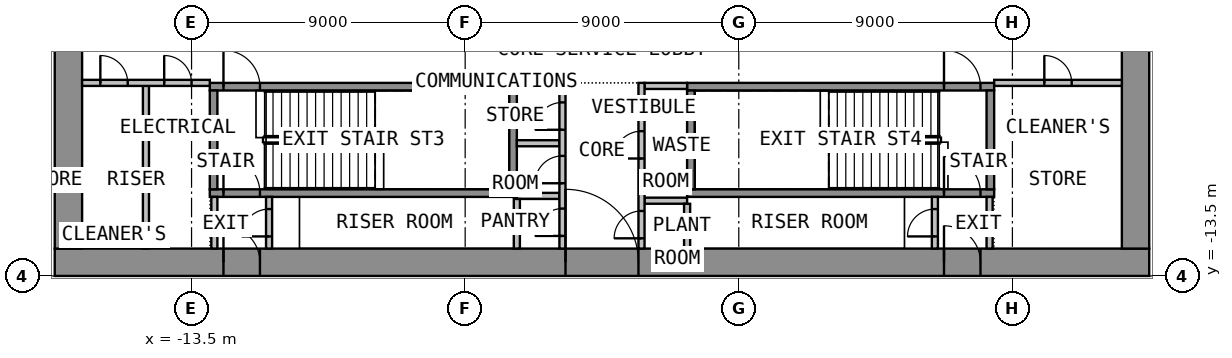
"""IFC4 building model, lengths in metres.
Left out: names, types, materials, properties, quantities, classifications, styles, units other than length and angle.
Written with IfcOpenShell. Run it as: python <this file> out.ifc"""

import sys

from ifc_helpers import new_model, si_unit, direction, frame, frame_2d, origin, place, context, subcontext, project, spatial, rectangle, extrude, element, fill, save


model = new_model("IFC4")
c1 = context("Model", 3, precision=1e-05, world=origin(), true_north=direction((0.0, 1.0)))
c2 = subcontext(c1, "Body", "Model", "MODEL_VIEW")
j1 = project(units=[si_unit("LENGTHUNIT", "METRE"), si_unit("PLANEANGLEUNIT", "RADIAN")], contexts=[c1])
p1 = place(None, origin())
s1 = spatial("IfcSite", under=j1, at=p1, CompositionType="ELEMENT")
p2 = place(p1, origin())
s2 = spatial("IfcBuilding", under=s1, at=p2, CompositionType="ELEMENT")
p3 = place(p2, frame((0.0, 0.0, 10.8)))
s3 = spatial("IfcBuildingStorey", under=s2, at=p3, CompositionType="ELEMENT", Elevation=10.8)
p4 = place(p3, frame((-18.0, -13.05, 0.0), z_axis=(0.0, 0.0, 1.0), x_axis=(1.0, 0.0, 0.0)))
e1 = element("IfcWall", 1, at=p4, inside=s3, PredefinedType="SHEAR", context=c2, shape_type="SweptSolid", body=[
    extrude(rectangle(XDim=36.0, YDim=0.9, at=frame_2d((18.0, 0.0))), origin(), (0.0, 0.0, 1.0), 4.4),
])
p5 = place(p4, frame((16.8, 0.0, 0.0)))
e2 = element("IfcOpeningElement", 2, at=p5, cuts=e1, PredefinedType="OPENING", context=c2, shape_type="SweptSolid", body=[
    extrude(rectangle(XDim=2.4, YDim=2.1, at=frame_2d((1.2, 1.05))), frame((0.0, 0.46, 0.0), z_axis=(0.0, -1.0, 0.0), x_axis=(1.0, 0.0, 0.0)), (0.0, 0.0, 1.0), 0.92),
])
p6 = place(p4, frame((5.55, 0.0, 0.0)))
e3 = element("IfcOpeningElement", 3, at=p6, cuts=e1, PredefinedType="OPENING", context=c2, shape_type="SweptSolid", body=[
    extrude(rectangle(XDim=1.2, YDim=2.1, at=frame_2d((0.6, 1.05))), frame((0.0, 0.46, 0.0), z_axis=(0.0, -1.0, 0.0), x_axis=(1.0, 0.0, 0.0)), (0.0, 0.0, 1.0), 0.92),
])
p7 = place(p4, frame((29.25, 0.0, 0.0)))
e4 = element("IfcOpeningElement", 4, at=p7, cuts=e1, PredefinedType="OPENING", context=c2, shape_type="SweptSolid", body=[
    extrude(rectangle(XDim=1.2, YDim=2.1, at=frame_2d((0.6, 1.05))), frame((0.0, 0.46, 0.0), z_axis=(0.0, -1.0, 0.0), x_axis=(1.0, 0.0, 0.0)), (0.0, 0.0, 1.0), 0.92),
])
p8 = place(p3, frame((-17.55, -12.6, 0.0), z_axis=(0.0, 0.0, 1.0), x_axis=(0.0, 1.0, 0.0)))
e5 = element("IfcWall", 5, at=p8, inside=s3, PredefinedType="SHEAR", context=c2, shape_type="SweptSolid", body=[
    extrude(rectangle(XDim=25.2, YDim=0.9, at=frame_2d((12.6, 0.0))), origin(), (0.0, 0.0, 1.0), 4.4),
])
p9 = place(p8, frame((11.4, 0.0, 0.0)))
e6 = element("IfcOpeningElement", 6, at=p9, cuts=e5, PredefinedType="OPENING", context=c2, shape_type="SweptSolid", body=[
    extrude(rectangle(XDim=2.4, YDim=2.1, at=frame_2d((1.2, 1.05))), frame((0.0, 0.46, 0.0), z_axis=(0.0, -1.0, 0.0), x_axis=(1.0, 0.0, 0.0)), (0.0, 0.0, 1.0), 0.92),
])
p10 = place(p3, frame((17.55, -12.6, 0.0), z_axis=(0.0, 0.0, 1.0), x_axis=(0.0, 1.0, 0.0)))
e7 = element("IfcWall", 7, at=p10, inside=s3, PredefinedType="SHEAR", context=c2, shape_type="SweptSolid", body=[
    extrude(rectangle(XDim=25.2, YDim=0.9, at=frame_2d((12.6, 0.0))), origin(), (0.0, 0.0, 1.0), 4.4),
])
p11 = place(p10, frame((11.4, 0.0, 0.0)))
e8 = element("IfcOpeningElement", 8, at=p11, cuts=e7, PredefinedType="OPENING", context=c2, shape_type="SweptSolid", body=[
    extrude(rectangle(XDim=2.4, YDim=2.1, at=frame_2d((1.2, 1.05))), frame((0.0, 0.46, 0.0), z_axis=(0.0, -1.0, 0.0), x_axis=(1.0, 0.0, 0.0)), (0.0, 0.0, 1.0), 0.92),
])
p12 = place(p3, frame((-12.9, -10.775, 0.0), z_axis=(0.0, 0.0, 1.0), x_axis=(1.0, 0.0, 0.0)))
e9 = element("IfcWall", 9, at=p12, inside=s3, PredefinedType="SHEAR", context=c2, shape_type="SweptSolid", body=[
    extrude(rectangle(XDim=10.1, YDim=0.25, at=frame_2d((5.05, 0.0))), origin(), (0.0, 0.0, 1.0), 4.4),
])
p13 = place(p12, frame((0.45, 0.0, 0.0)))
e10 = element("IfcOpeningElement", 10, at=p13, cuts=e9, PredefinedType="OPENING", context=c2, shape_type="SweptSolid", body=[
    extrude(rectangle(XDim=1.2, YDim=2.1, at=frame_2d((0.6, 1.05))), frame((0.0, 0.135, 0.0), z_axis=(0.0, -1.0, 0.0), x_axis=(1.0, 0.0, 0.0)), (0.0, 0.0, 1.0), 0.27),
])
p14 = place(p3, frame((-12.9, -7.275, 0.0), z_axis=(0.0, 0.0, 1.0), x_axis=(1.0, 0.0, 0.0)))
e11 = element("IfcWall", 11, at=p14, inside=s3, PredefinedType="SHEAR", context=c2, shape_type="SweptSolid", body=[
    extrude(rectangle(XDim=10.1, YDim=0.25, at=frame_2d((5.05, 0.0))), origin(), (0.0, 0.0, 1.0), 4.4),
])
p15 = place(p14, frame((0.45, 0.0, 0.0)))
e12 = element("IfcOpeningElement", 12, at=p15, cuts=e11, PredefinedType="OPENING", context=c2, shape_type="SweptSolid", body=[
    extrude(rectangle(XDim=1.2, YDim=2.1, at=frame_2d((0.6, 1.05))), frame((0.0, 0.135, 0.0), z_axis=(0.0, -1.0, 0.0), x_axis=(1.0, 0.0, 0.0)), (0.0, 0.0, 1.0), 0.27),
])
for number, where, z_axis, x_axis in (
    (13, (-12.775, -10.65, 0.0), (0.0, 0.0, 1.0), (0.0, 1.0, 0.0)),
    (14, (-2.925, -10.65, 0.0), (0.0, 0.0, 1.0), (0.0, 1.0, 0.0)),
):
    element("IfcWall", number, at=place(p3, frame(where, z_axis=z_axis, x_axis=x_axis)), inside=s3, PredefinedType="SHEAR", context=c2, shape_type="SweptSolid", body=[
        extrude(rectangle(XDim=3.25, YDim=0.25, at=frame_2d((1.625, 0.0))), origin(), (0.0, 0.0, 1.0), 4.4),
    ])
p16 = place(p3, frame((2.8, -10.775, 0.0), z_axis=(0.0, 0.0, 1.0), x_axis=(1.0, 0.0, 0.0)))
e15 = element("IfcWall", 15, at=p16, inside=s3, PredefinedType="SHEAR", context=c2, shape_type="SweptSolid", body=[
    extrude(rectangle(XDim=10.1, YDim=0.25, at=frame_2d((5.05, 0.0))), origin(), (0.0, 0.0, 1.0), 4.4),
])
p17 = place(p16, frame((8.45, 0.0, 0.0)))
e16 = element("IfcOpeningElement", 16, at=p17, cuts=e15, PredefinedType="OPENING", context=c2, shape_type="SweptSolid", body=[
    extrude(rectangle(XDim=1.2, YDim=2.1, at=frame_2d((0.6, 1.05))), frame((0.0, 0.135, 0.0), z_axis=(0.0, -1.0, 0.0), x_axis=(1.0, 0.0, 0.0)), (0.0, 0.0, 1.0), 0.27),
])
p18 = place(p3, frame((2.8, -7.275, 0.0), z_axis=(0.0, 0.0, 1.0), x_axis=(1.0, 0.0, 0.0)))
e17 = element("IfcWall", 17, at=p18, inside=s3, PredefinedType="SHEAR", context=c2, shape_type="SweptSolid", body=[
    extrude(rectangle(XDim=10.1, YDim=0.25, at=frame_2d((5.05, 0.0))), origin(), (0.0, 0.0, 1.0), 4.4),
])
p19 = place(p18, frame((8.45, 0.0, 0.0)))
e18 = element("IfcOpeningElement", 18, at=p19, cuts=e17, PredefinedType="OPENING", context=c2, shape_type="SweptSolid", body=[
    extrude(rectangle(XDim=1.2, YDim=2.1, at=frame_2d((0.6, 1.05))), frame((0.0, 0.135, 0.0), z_axis=(0.0, -1.0, 0.0), x_axis=(1.0, 0.0, 0.0)), (0.0, 0.0, 1.0), 0.27),
])
for number, where, z_axis, x_axis in (
    (19, (2.925, -10.65, 0.0), (0.0, 0.0, 1.0), (0.0, 1.0, 0.0)),
    (20, (12.775, -10.65, 0.0), (0.0, 0.0, 1.0), (0.0, 1.0, 0.0)),
):
    element("IfcWall", number, at=place(p3, frame(where, z_axis=z_axis, x_axis=x_axis)), inside=s3, PredefinedType="SHEAR", context=c2, shape_type="SweptSolid", body=[
        extrude(rectangle(XDim=3.25, YDim=0.25, at=frame_2d((1.625, 0.0))), origin(), (0.0, 0.0, 1.0), 4.4),
    ])
for number, where, z_axis, x_axis in (
    (21, (-2.8, -7.25, 0.0), (0.0, 0.0, 1.0), (1.0, 0.0, 0.0)),
    (22, (-2.8, -9.135, 0.0), (0.0, 0.0, 1.0), (1.0, 0.0, 0.0)),
    (23, (-2.8, -10.867, 0.0), (0.0, 0.0, 1.0), (1.0, 0.0, 0.0)),
    (24, (1.4, -7.25, 0.0), (0.0, 0.0, 1.0), (1.0, 0.0, 0.0)),
    (25, (1.4, -11.025, 0.0), (0.0, 0.0, 1.0), (1.0, 0.0, 0.0)),
):
    element("IfcWall", number, at=place(p3, frame(where, z_axis=z_axis, x_axis=x_axis)), inside=s3, PredefinedType="PARTITIONING", context=c2, shape_type="SweptSolid", body=[
        extrude(rectangle(XDim=1.4, YDim=0.2, at=frame_2d((0.7, 0.0))), origin(), (0.0, 0.0, 1.0), 4.4),
    ])
p20 = place(p3, frame((-1.3, -12.6, 0.0), z_axis=(0.0, 0.0, 1.0), x_axis=(0.0, 1.0, 0.0)))
e26 = element("IfcWall", 26, at=p20, inside=s3, PredefinedType="PARTITIONING", context=c2, shape_type="SweptSolid", body=[
    extrude(rectangle(XDim=5.45, YDim=0.2, at=frame_2d((2.725, 0.0))), origin(), (0.0, 0.0, 1.0), 4.4),
])
p21 = place(p20, frame((0.416, 0.0, 0.0)))
e27 = element("IfcOpeningElement", 27, at=p21, cuts=e26, PredefinedType="OPENING", context=c2, shape_type="SweptSolid", body=[
    extrude(rectangle(XDim=0.9, YDim=2.1, at=frame_2d((0.45, 1.05))), frame((0.0, 0.11, 0.0), z_axis=(0.0, -1.0, 0.0), x_axis=(1.0, 0.0, 0.0)), (0.0, 0.0, 1.0), 0.22),
])
p22 = place(p20, frame((2.149, 0.0, 0.0)))
e28 = element("IfcOpeningElement", 28, at=p22, cuts=e26, PredefinedType="OPENING", context=c2, shape_type="SweptSolid", body=[
    extrude(rectangle(XDim=0.9, YDim=2.1, at=frame_2d((0.45, 1.05))), frame((0.0, 0.11, 0.0), z_axis=(0.0, -1.0, 0.0), x_axis=(1.0, 0.0, 0.0)), (0.0, 0.0, 1.0), 0.22),
])
p23 = place(p20, frame((3.907, 0.0, 0.0)))
e29 = element("IfcOpeningElement", 29, at=p23, cuts=e26, PredefinedType="OPENING", context=c2, shape_type="SweptSolid", body=[
    extrude(rectangle(XDim=0.9, YDim=2.1, at=frame_2d((0.45, 1.05))), frame((0.0, 0.11, 0.0), z_axis=(0.0, -1.0, 0.0), x_axis=(1.0, 0.0, 0.0)), (0.0, 0.0, 1.0), 0.22),
])
p24 = place(p3, frame((1.3, -12.6, 0.0), z_axis=(0.0, 0.0, 1.0), x_axis=(0.0, 1.0, 0.0)))
e30 = element("IfcWall", 30, at=p24, inside=s3, PredefinedType="PARTITIONING", context=c2, shape_type="SweptSolid", body=[
    extrude(rectangle(XDim=5.45, YDim=0.2, at=frame_2d((2.725, 0.0))), origin(), (0.0, 0.0, 1.0), 4.4),
])
p25 = place(p24, frame((0.337, 0.0, 0.0)))
e31 = element("IfcOpeningElement", 31, at=p25, cuts=e30, PredefinedType="OPENING", context=c2, shape_type="SweptSolid", body=[
    extrude(rectangle(XDim=0.9, YDim=2.1, at=frame_2d((0.45, 1.05))), frame((0.0, 0.11, 0.0), z_axis=(0.0, -1.0, 0.0), x_axis=(1.0, 0.0, 0.0)), (0.0, 0.0, 1.0), 0.22),
])
p26 = place(p24, frame((2.962, 0.0, 0.0)))
e32 = element("IfcOpeningElement", 32, at=p26, cuts=e30, PredefinedType="OPENING", context=c2, shape_type="SweptSolid", body=[
    extrude(rectangle(XDim=0.9, YDim=2.1, at=frame_2d((0.45, 1.05))), frame((0.0, 0.11, 0.0), z_axis=(0.0, -1.0, 0.0), x_axis=(1.0, 0.0, 0.0)), (0.0, 0.0, 1.0), 0.22),
])
p27 = place(p3, frame((-12.75, -12.6, 0.0), z_axis=(0.0, 0.0, 1.0), x_axis=(0.0, 1.0, 0.0)))
e33 = element("IfcWall", 33, at=p27, inside=s3, PredefinedType="PARTITIONING", context=c2, shape_type="SweptSolid", body=[
    extrude(rectangle(XDim=1.7, YDim=0.2, at=frame_2d((0.85, 0.0))), origin(), (0.0, 0.0, 1.0), 4.4),
])
p28 = place(p3, frame((-10.95, -12.6, 0.0), z_axis=(0.0, 0.0, 1.0), x_axis=(0.0, 1.0, 0.0)))
e34 = element("IfcWall", 34, at=p28, inside=s3, PredefinedType="PARTITIONING", context=c2, shape_type="SweptSolid", body=[
    extrude(rectangle(XDim=1.7, YDim=0.2, at=frame_2d((0.85, 0.0))), origin(), (0.0, 0.0, 1.0), 4.4),
])
p29 = place(p28, frame((0.4, 0.0, 0.0)))
e35 = element("IfcOpeningElement", 35, at=p29, cuts=e34, PredefinedType="OPENING", context=c2, shape_type="SweptSolid", body=[
    extrude(rectangle(XDim=0.9, YDim=2.1, at=frame_2d((0.45, 1.05))), frame((0.0, 0.11, 0.0), z_axis=(0.0, -1.0, 0.0), x_axis=(1.0, 0.0, 0.0)), (0.0, 0.0, 1.0), 0.22),
])
p30 = place(p3, frame((12.75, -12.6, 0.0), z_axis=(0.0, 0.0, 1.0), x_axis=(0.0, 1.0, 0.0)))
e36 = element("IfcWall", 36, at=p30, inside=s3, PredefinedType="PARTITIONING", context=c2, shape_type="SweptSolid", body=[
    extrude(rectangle(XDim=1.7, YDim=0.2, at=frame_2d((0.85, 0.0))), origin(), (0.0, 0.0, 1.0), 4.4),
])
p31 = place(p3, frame((10.95, -12.6, 0.0), z_axis=(0.0, 0.0, 1.0), x_axis=(0.0, 1.0, 0.0)))
e37 = element("IfcWall", 37, at=p31, inside=s3, PredefinedType="PARTITIONING", context=c2, shape_type="SweptSolid", body=[
    extrude(rectangle(XDim=1.7, YDim=0.2, at=frame_2d((0.85, 0.0))), origin(), (0.0, 0.0, 1.0), 4.4),
])
p32 = place(p31, frame((0.4, 0.0, 0.0)))
e38 = element("IfcOpeningElement", 38, at=p32, cuts=e37, PredefinedType="OPENING", context=c2, shape_type="SweptSolid", body=[
    extrude(rectangle(XDim=0.9, YDim=2.1, at=frame_2d((0.45, 1.05))), frame((0.0, 0.11, 0.0), z_axis=(0.0, -1.0, 0.0), x_axis=(1.0, 0.0, 0.0)), (0.0, 0.0, 1.0), 0.22),
])
p33 = place(p3, frame((-15.0, -12.6, 0.0), z_axis=(0.0, 0.0, 1.0), x_axis=(0.0, 1.0, 0.0)))
e39 = element("IfcWall", 39, at=p33, inside=s3, PredefinedType="PARTITIONING", context=c2, shape_type="SweptSolid", body=[
    extrude(rectangle(XDim=5.45, YDim=0.2, at=frame_2d((2.725, 0.0))), origin(), (0.0, 0.0, 1.0), 4.4),
])
p34 = place(p3, frame((-17.1, -7.15, 0.0), z_axis=(0.0, 0.0, 1.0), x_axis=(1.0, 0.0, 0.0)))
e40 = element("IfcWall", 40, at=p34, inside=s3, PredefinedType="PARTITIONING", context=c2, shape_type="SweptSolid", body=[
    extrude(rectangle(XDim=4.2, YDim=0.2, at=frame_2d((2.1, 0.0))), origin(), (0.0, 0.0, 1.0), 4.4),
])
p35 = place(p34, frame((0.6, 0.0, 0.0)))
e41 = element("IfcOpeningElement", 41, at=p35, cuts=e40, PredefinedType="OPENING", context=c2, shape_type="SweptSolid", body=[
    extrude(rectangle(XDim=0.9, YDim=2.1, at=frame_2d((0.45, 1.05))), frame((0.0, 0.11, 0.0), z_axis=(0.0, -1.0, 0.0), x_axis=(1.0, 0.0, 0.0)), (0.0, 0.0, 1.0), 0.22),
])
p36 = place(p34, frame((2.7, 0.0, 0.0)))
e42 = element("IfcOpeningElement", 42, at=p36, cuts=e40, PredefinedType="OPENING", context=c2, shape_type="SweptSolid", body=[
    extrude(rectangle(XDim=0.9, YDim=2.1, at=frame_2d((0.45, 1.05))), frame((0.0, 0.11, 0.0), z_axis=(0.0, -1.0, 0.0), x_axis=(1.0, 0.0, 0.0)), (0.0, 0.0, 1.0), 0.22),
])
p37 = place(p3, frame((12.9, -7.15, 0.0), z_axis=(0.0, 0.0, 1.0), x_axis=(1.0, 0.0, 0.0)))
e43 = element("IfcWall", 43, at=p37, inside=s3, PredefinedType="PARTITIONING", context=c2, shape_type="SweptSolid", body=[
    extrude(rectangle(XDim=4.2, YDim=0.2, at=frame_2d((2.1, 0.0))), origin(), (0.0, 0.0, 1.0), 4.4),
])
p38 = place(p37, frame((1.65, 0.0, 0.0)))
e44 = element("IfcOpeningElement", 44, at=p38, cuts=e43, PredefinedType="OPENING", context=c2, shape_type="SweptSolid", body=[
    extrude(rectangle(XDim=0.9, YDim=2.1, at=frame_2d((0.45, 1.05))), frame((0.0, 0.11, 0.0), z_axis=(0.0, -1.0, 0.0), x_axis=(1.0, 0.0, 0.0)), (0.0, 0.0, 1.0), 0.22),
])
p39 = place(p3, frame((-2.8, -12.599, 0.0), z_axis=(0.0, 0.0, 1.0), x_axis=(0.0, 1.0, 0.0)))
e45 = element("IfcWall", 45, at=p39, inside=s3, PredefinedType="PARTITIONING", context=c2, shape_type="SweptSolid", body=[
    extrude(rectangle(XDim=1.631, YDim=0.2, at=frame_2d((0.815, 0.0))), origin(), (0.0, 0.0, 1.0), 4.4),
])
p40 = place(p3, frame((2.8, -11.126, 0.0), z_axis=(0.0, 0.0, 1.0), x_axis=(0.0, -1.0, 0.0)))
e46 = element("IfcWall", 46, at=p40, inside=s3, PredefinedType="PARTITIONING", context=c2, shape_type="SweptSolid", body=[
    extrude(rectangle(XDim=1.473, YDim=0.2, at=frame_2d((0.737, 0.0))), origin(), (0.0, 0.0, 1.0), 4.4),
])
p41 = place(p5, origin())
e47 = element("IfcDoor", 47, at=p41, inside=s3, OperationType="DOUBLE_DOOR_DOUBLE_SWING", PredefinedType="DOOR", context=c2, shape_type="SweptSolid", body=[
    extrude(rectangle(XDim=2.4, YDim=2.1, at=frame_2d((1.2, 1.05))), frame((0.0, 0.025, 0.0), z_axis=(0.0, -1.0, 0.0), x_axis=(1.0, 0.0, 0.0)), (0.0, 0.0, 1.0), 0.05),
])
fill(e2, e47)
p42 = place(p6, origin())
e48 = element("IfcDoor", 48, at=p42, inside=s3, OperationType="SINGLE_SWING_RIGHT", PredefinedType="DOOR", context=c2, shape_type="SweptSolid", body=[
    extrude(rectangle(XDim=1.2, YDim=2.1, at=frame_2d((0.6, 1.05))), frame((0.0, 0.025, 0.0), z_axis=(0.0, -1.0, 0.0), x_axis=(1.0, 0.0, 0.0)), (0.0, 0.0, 1.0), 0.05),
])
fill(e3, e48)
p43 = place(p7, origin())
e49 = element("IfcDoor", 49, at=p43, inside=s3, OperationType="SINGLE_SWING_RIGHT", PredefinedType="DOOR", context=c2, shape_type="SweptSolid", body=[
    extrude(rectangle(XDim=1.2, YDim=2.1, at=frame_2d((0.6, 1.05))), frame((0.0, 0.025, 0.0), z_axis=(0.0, -1.0, 0.0), x_axis=(1.0, 0.0, 0.0)), (0.0, 0.0, 1.0), 0.05),
])
fill(e4, e49)
p44 = place(p15, origin())
e50 = element("IfcDoor", 50, at=p44, inside=s3, OperationType="SINGLE_SWING_LEFT", PredefinedType="DOOR", context=c2, shape_type="SweptSolid", body=[
    extrude(rectangle(XDim=1.2, YDim=2.1, at=frame_2d((0.6, 1.05))), frame((0.0, 0.025, 0.0), z_axis=(0.0, -1.0, 0.0), x_axis=(1.0, 0.0, 0.0)), (0.0, 0.0, 1.0), 0.05),
])
fill(e12, e50)
p45 = place(p19, origin())
e51 = element("IfcDoor", 51, at=p45, inside=s3, OperationType="SINGLE_SWING_LEFT", PredefinedType="DOOR", context=c2, shape_type="SweptSolid", body=[
    extrude(rectangle(XDim=1.2, YDim=2.1, at=frame_2d((0.6, 1.05))), frame((0.0, 0.025, 0.0), z_axis=(0.0, -1.0, 0.0), x_axis=(1.0, 0.0, 0.0)), (0.0, 0.0, 1.0), 0.05),
])
fill(e18, e51)
p46 = place(p21, origin())
e52 = element("IfcDoor", 52, at=p46, inside=s3, OperationType="SINGLE_SWING_LEFT", PredefinedType="DOOR", context=c2, shape_type="SweptSolid", body=[
    extrude(rectangle(XDim=0.9, YDim=2.1, at=frame_2d((0.45, 1.05))), frame((0.0, 0.025, 0.0), z_axis=(0.0, -1.0, 0.0), x_axis=(1.0, 0.0, 0.0)), (0.0, 0.0, 1.0), 0.05),
])
fill(e27, e52)
p47 = place(p22, origin())
e53 = element("IfcDoor", 53, at=p47, inside=s3, OperationType="SINGLE_SWING_LEFT", PredefinedType="DOOR", context=c2, shape_type="SweptSolid", body=[
    extrude(rectangle(XDim=0.9, YDim=2.1, at=frame_2d((0.45, 1.05))), frame((0.0, 0.025, 0.0), z_axis=(0.0, -1.0, 0.0), x_axis=(1.0, 0.0, 0.0)), (0.0, 0.0, 1.0), 0.05),
])
fill(e28, e53)
p48 = place(p23, origin())
e54 = element("IfcDoor", 54, at=p48, inside=s3, OperationType="SINGLE_SWING_LEFT", PredefinedType="DOOR", context=c2, shape_type="SweptSolid", body=[
    extrude(rectangle(XDim=0.9, YDim=2.1, at=frame_2d((0.45, 1.05))), frame((0.0, 0.025, 0.0), z_axis=(0.0, -1.0, 0.0), x_axis=(1.0, 0.0, 0.0)), (0.0, 0.0, 1.0), 0.05),
])
fill(e29, e54)
p49 = place(p25, origin())
e55 = element("IfcDoor", 55, at=p49, inside=s3, OperationType="SINGLE_SWING_LEFT", PredefinedType="DOOR", context=c2, shape_type="SweptSolid", body=[
    extrude(rectangle(XDim=0.9, YDim=2.1, at=frame_2d((0.45, 1.05))), frame((0.0, 0.025, 0.0), z_axis=(0.0, -1.0, 0.0), x_axis=(1.0, 0.0, 0.0)), (0.0, 0.0, 1.0), 0.05),
])
fill(e31, e55)
p50 = place(p26, origin())
e56 = element("IfcDoor", 56, at=p50, inside=s3, OperationType="SINGLE_SWING_LEFT", PredefinedType="DOOR", context=c2, shape_type="SweptSolid", body=[
    extrude(rectangle(XDim=0.9, YDim=2.1, at=frame_2d((0.45, 1.05))), frame((0.0, 0.025, 0.0), z_axis=(0.0, -1.0, 0.0), x_axis=(1.0, 0.0, 0.0)), (0.0, 0.0, 1.0), 0.05),
])
fill(e32, e56)
p51 = place(p13, origin())
e57 = element("IfcDoor", 57, at=p51, inside=s3, OperationType="SINGLE_SWING_RIGHT", PredefinedType="DOOR", context=c2, shape_type="SweptSolid", body=[
    extrude(rectangle(XDim=1.2, YDim=2.1, at=frame_2d((0.6, 1.05))), frame((0.0, 0.025, 0.0), z_axis=(0.0, -1.0, 0.0), x_axis=(1.0, 0.0, 0.0)), (0.0, 0.0, 1.0), 0.05),
])
fill(e10, e57)
p52 = place(p29, origin())
e58 = element("IfcDoor", 58, at=p52, inside=s3, OperationType="SINGLE_SWING_LEFT", PredefinedType="DOOR", context=c2, shape_type="SweptSolid", body=[
    extrude(rectangle(XDim=0.9, YDim=2.1, at=frame_2d((0.45, 1.05))), frame((0.0, 0.025, 0.0), z_axis=(0.0, -1.0, 0.0), x_axis=(1.0, 0.0, 0.0)), (0.0, 0.0, 1.0), 0.05),
])
fill(e35, e58)
p53 = place(p17, origin())
e59 = element("IfcDoor", 59, at=p53, inside=s3, OperationType="SINGLE_SWING_RIGHT", PredefinedType="DOOR", context=c2, shape_type="SweptSolid", body=[
    extrude(rectangle(XDim=1.2, YDim=2.1, at=frame_2d((0.6, 1.05))), frame((0.0, 0.025, 0.0), z_axis=(0.0, -1.0, 0.0), x_axis=(1.0, 0.0, 0.0)), (0.0, 0.0, 1.0), 0.05),
])
fill(e16, e59)
p54 = place(p32, origin())
e60 = element("IfcDoor", 60, at=p54, inside=s3, OperationType="SINGLE_SWING_LEFT", PredefinedType="DOOR", context=c2, shape_type="SweptSolid", body=[
    extrude(rectangle(XDim=0.9, YDim=2.1, at=frame_2d((0.45, 1.05))), frame((0.0, 0.025, 0.0), z_axis=(0.0, -1.0, 0.0), x_axis=(1.0, 0.0, 0.0)), (0.0, 0.0, 1.0), 0.05),
])
fill(e38, e60)
p55 = place(p35, origin())
e61 = element("IfcDoor", 61, at=p55, inside=s3, OperationType="SINGLE_SWING_LEFT", PredefinedType="DOOR", context=c2, shape_type="SweptSolid", body=[
    extrude(rectangle(XDim=0.9, YDim=2.1, at=frame_2d((0.45, 1.05))), frame((0.0, 0.025, 0.0), z_axis=(0.0, -1.0, 0.0), x_axis=(1.0, 0.0, 0.0)), (0.0, 0.0, 1.0), 0.05),
])
fill(e41, e61)
p56 = place(p36, origin())
e62 = element("IfcDoor", 62, at=p56, inside=s3, OperationType="SINGLE_SWING_LEFT", PredefinedType="DOOR", context=c2, shape_type="SweptSolid", body=[
    extrude(rectangle(XDim=0.9, YDim=2.1, at=frame_2d((0.45, 1.05))), frame((0.0, 0.025, 0.0), z_axis=(0.0, -1.0, 0.0), x_axis=(1.0, 0.0, 0.0)), (0.0, 0.0, 1.0), 0.05),
])
fill(e42, e62)
p57 = place(p38, origin())
e63 = element("IfcDoor", 63, at=p57, inside=s3, OperationType="SINGLE_SWING_LEFT", PredefinedType="DOOR", context=c2, shape_type="SweptSolid", body=[
    extrude(rectangle(XDim=0.9, YDim=2.1, at=frame_2d((0.45, 1.05))), frame((0.0, 0.025, 0.0), z_axis=(0.0, -1.0, 0.0), x_axis=(1.0, 0.0, 0.0)), (0.0, 0.0, 1.0), 0.05),
])
fill(e44, e63)
save(model, sys.argv[1])
